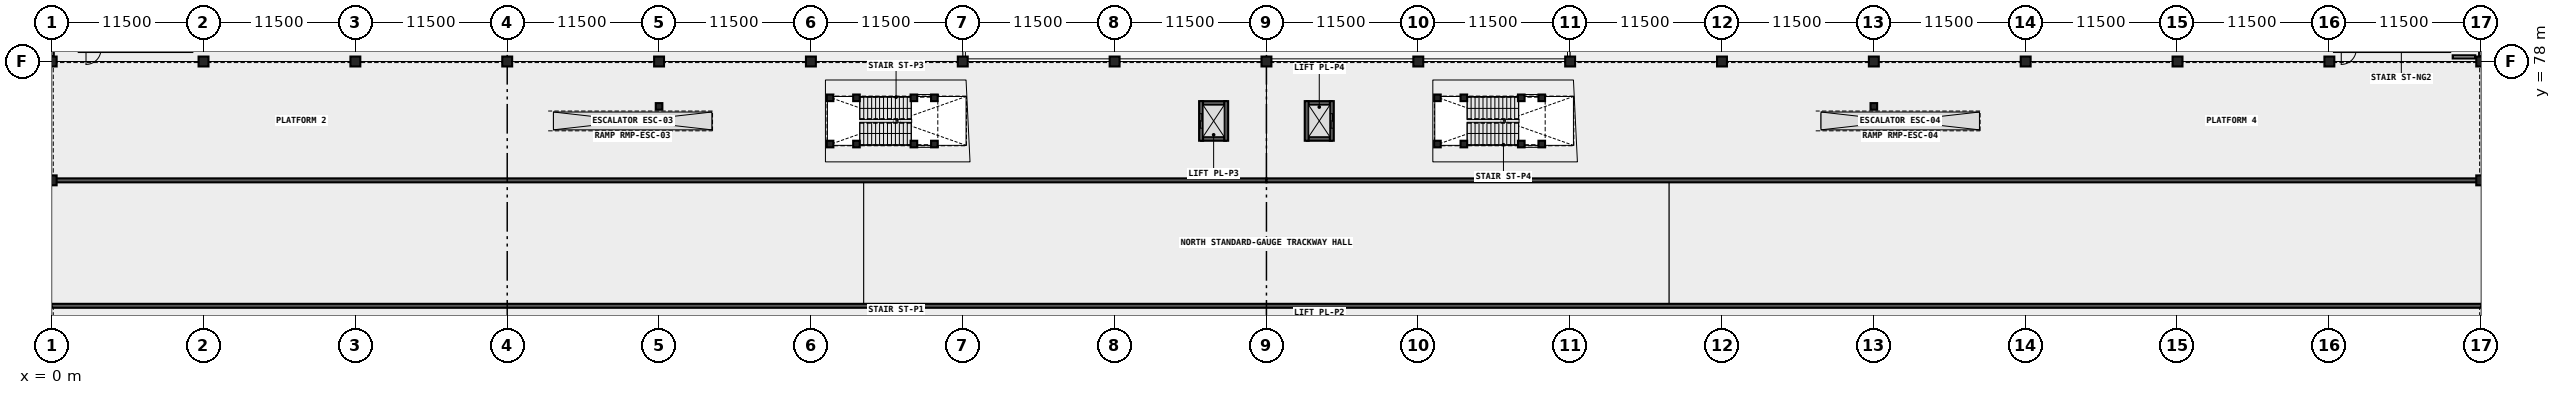
"""IFC4 building model, lengths in metres.
Left out: names, types, materials, properties, quantities, classifications, styles, units other than length and angle.
Written with IfcOpenShell. Run it as: python <this file> out.ifc"""

import sys

from ifc_helpers import new_model, si_unit, direction, frame, frame_2d, origin, origin_2d, place, context, subcontext, project, spatial, rectangle, extrude, element, fill, save


model = new_model("IFC4")
c1 = context("Model", 3, precision=1e-05, world=origin(), true_north=direction((0.0, 1.0)))
c2 = subcontext(c1, "Body", "Model", "MODEL_VIEW")
j1 = project(units=[si_unit("LENGTHUNIT", "METRE"), si_unit("PLANEANGLEUNIT", "RADIAN")], contexts=[c1])
p1 = place(None, origin())
s1 = spatial("IfcSite", under=j1, at=p1, CompositionType="ELEMENT")
p2 = place(p1, origin())
s2 = spatial("IfcBuilding", under=s1, at=p2, CompositionType="ELEMENT")
p3 = place(p2, origin())
s3 = spatial("IfcBuildingStorey", under=s2, at=p3, CompositionType="ELEMENT", Elevation=0.0)
for number, where, z_axis, x_axis in (
    (1, (0.0, 78.0, 0.0), (0.0, 0.0, 1.0), (1.0, 0.0, 0.0)),
    (2, (11.5, 78.0, 0.0), (0.0, 0.0, 1.0), (1.0, 0.0, 0.0)),
    (3, (23.0, 78.0, 0.0), (0.0, 0.0, 1.0), (1.0, 0.0, 0.0)),
    (4, (34.5, 78.0, 0.0), (0.0, 0.0, 1.0), (1.0, 0.0, 0.0)),
    (5, (46.0, 78.0, 0.0), (0.0, 0.0, 1.0), (1.0, 0.0, 0.0)),
    (6, (57.5, 78.0, 0.0), (0.0, 0.0, 1.0), (1.0, 0.0, 0.0)),
    (7, (69.0, 78.0, 0.0), (0.0, 0.0, 1.0), (1.0, 0.0, 0.0)),
    (8, (80.5, 78.0, 0.0), (0.0, 0.0, 1.0), (1.0, 0.0, 0.0)),
    (9, (92.0, 78.0, 0.0), (0.0, 0.0, 1.0), (1.0, 0.0, 0.0)),
    (10, (103.5, 78.0, 0.0), (0.0, 0.0, 1.0), (1.0, 0.0, 0.0)),
    (11, (115.0, 78.0, 0.0), (0.0, 0.0, 1.0), (1.0, 0.0, 0.0)),
    (12, (126.5, 78.0, 0.0), (0.0, 0.0, 1.0), (1.0, 0.0, 0.0)),
    (13, (138.0, 78.0, 0.0), (0.0, 0.0, 1.0), (1.0, 0.0, 0.0)),
    (14, (149.5, 78.0, 0.0), (0.0, 0.0, 1.0), (1.0, 0.0, 0.0)),
    (15, (161.0, 78.0, 0.0), (0.0, 0.0, 1.0), (1.0, 0.0, 0.0)),
    (16, (172.5, 78.0, 0.0), (0.0, 0.0, 1.0), (1.0, 0.0, 0.0)),
    (17, (184.0, 78.0, 0.0), (0.0, 0.0, 1.0), (1.0, 0.0, 0.0)),
):
    element("IfcColumn", number, at=place(p3, frame(where, z_axis=z_axis, x_axis=x_axis)), inside=s3, PredefinedType="COLUMN", context=c2, shape_type="SweptSolid", body=[
        extrude(rectangle(XDim=0.75, YDim=0.75, at=origin_2d()), origin(), (0.0, 0.0, 1.0), 4.2),
    ])
for number, where, z_axis, x_axis in (
    (18, (87.05, 72.15, 0.95), (0.0, 0.0, 1.0), (1.0, 0.0, 0.0)),
    (19, (87.05, 74.85, 0.95), (0.0, 0.0, 1.0), (1.0, 0.0, 0.0)),
):
    element("IfcWall", number, at=place(p3, frame(where, z_axis=z_axis, x_axis=x_axis)), inside=s3, PredefinedType="SHEAR", context=c2, shape_type="SweptSolid", body=[
        extrude(rectangle(XDim=1.9, YDim=0.3, at=frame_2d((0.95, 0.0))), origin(), (0.0, 0.0, 1.0), 3.25),
    ])
p4 = place(p3, frame((87.05, 72.0, 0.95), z_axis=(0.0, 0.0, 1.0), x_axis=(0.0, 1.0, 0.0)))
e20 = element("IfcWall", 20, at=p4, inside=s3, PredefinedType="SHEAR", context=c2, shape_type="SweptSolid", body=[
    extrude(rectangle(XDim=3.0, YDim=0.3, at=frame_2d((1.5, 0.0))), origin(), (0.0, 0.0, 1.0), 3.25),
])
p5 = place(p4, frame((0.95, 0.0, 0.3)))
e21 = element("IfcOpeningElement", 21, at=p5, cuts=e20, PredefinedType="OPENING", context=c2, shape_type="SweptSolid", body=[
    extrude(rectangle(XDim=1.1, YDim=2.15, at=frame_2d((0.55, 1.075))), frame((0.0, 0.16, 0.0), z_axis=(0.0, -1.0, 0.0), x_axis=(1.0, 0.0, 0.0)), (0.0, 0.0, 1.0), 0.32),
])
p6 = place(p3, frame((88.95, 72.0, 0.95), z_axis=(0.0, 0.0, 1.0), x_axis=(0.0, 1.0, 0.0)))
e22 = element("IfcWall", 22, at=p6, inside=s3, PredefinedType="SHEAR", context=c2, shape_type="SweptSolid", body=[
    extrude(rectangle(XDim=3.0, YDim=0.3, at=frame_2d((1.5, 0.0))), origin(), (0.0, 0.0, 1.0), 3.25),
])
for number, where, z_axis, x_axis in (
    (23, (95.05, 72.15, 0.95), (0.0, 0.0, 1.0), (1.0, 0.0, 0.0)),
    (24, (95.05, 74.85, 0.95), (0.0, 0.0, 1.0), (1.0, 0.0, 0.0)),
):
    element("IfcWall", number, at=place(p3, frame(where, z_axis=z_axis, x_axis=x_axis)), inside=s3, PredefinedType="SHEAR", context=c2, shape_type="SweptSolid", body=[
        extrude(rectangle(XDim=1.9, YDim=0.3, at=frame_2d((0.95, 0.0))), origin(), (0.0, 0.0, 1.0), 3.25),
    ])
p7 = place(p3, frame((95.05, 72.0, 0.95), z_axis=(0.0, 0.0, 1.0), x_axis=(0.0, 1.0, 0.0)))
e25 = element("IfcWall", 25, at=p7, inside=s3, PredefinedType="SHEAR", context=c2, shape_type="SweptSolid", body=[
    extrude(rectangle(XDim=3.0, YDim=0.3, at=frame_2d((1.5, 0.0))), origin(), (0.0, 0.0, 1.0), 3.25),
])
p8 = place(p3, frame((96.95, 72.0, 0.95), z_axis=(0.0, 0.0, 1.0), x_axis=(0.0, 1.0, 0.0)))
e26 = element("IfcWall", 26, at=p8, inside=s3, PredefinedType="SHEAR", context=c2, shape_type="SweptSolid", body=[
    extrude(rectangle(XDim=3.0, YDim=0.3, at=frame_2d((1.5, 0.0))), origin(), (0.0, 0.0, 1.0), 3.25),
])
p9 = place(p8, frame((0.95, 0.0, 0.3)))
e27 = element("IfcOpeningElement", 27, at=p9, cuts=e26, PredefinedType="OPENING", context=c2, shape_type="SweptSolid", body=[
    extrude(rectangle(XDim=1.1, YDim=2.15, at=frame_2d((0.55, 1.075))), frame((0.0, 0.16, 0.0), z_axis=(0.0, -1.0, 0.0), x_axis=(1.0, 0.0, 0.0)), (0.0, 0.0, 1.0), 0.32),
])
p10 = place(p3, frame((0.0, 59.5, -0.32), z_axis=(0.0, 0.0, 1.0), x_axis=(1.0, 0.0, 0.0)))
e28 = element("IfcWall", 28, at=p10, inside=s3, PredefinedType="SHEAR", context=c2, shape_type="SweptSolid", body=[
    extrude(rectangle(XDim=184.0, YDim=0.3, at=frame_2d((92.0, 0.0))), origin(), (0.0, 0.0, 1.0), 1.27),
])
for number, where, z_axis, x_axis in (
    (29, (58.95, 71.75, -0.32), (0.0, 0.0, 1.0), (1.0, 0.0, 0.0)),
    (30, (58.95, 75.25, -0.32), (0.0, 0.0, 1.0), (1.0, 0.0, 0.0)),
    (31, (60.95, 71.75, -0.32), (0.0, 0.0, 1.0), (1.0, 0.0, 0.0)),
    (32, (60.95, 75.25, -0.32), (0.0, 0.0, 1.0), (1.0, 0.0, 0.0)),
):
    element("IfcColumn", number, at=place(p3, frame(where, z_axis=z_axis, x_axis=x_axis)), inside=s3, PredefinedType="COLUMN", context=c2, shape_type="SweptSolid", body=[
        extrude(rectangle(XDim=0.5, YDim=0.5, at=origin_2d()), origin(), (0.0, 0.0, 1.0), 4.22),
    ])
for number, where, z_axis, x_axis in (
    (33, (65.3, 71.75, -0.32), (0.0, 0.0, 1.0), (1.0, 0.0, 0.0)),
    (34, (65.3, 75.25, -0.32), (0.0, 0.0, 1.0), (1.0, 0.0, 0.0)),
    (35, (66.85, 71.75, -0.32), (0.0, 0.0, 1.0), (1.0, 0.0, 0.0)),
    (36, (66.85, 75.25, -0.32), (0.0, 0.0, 1.0), (1.0, 0.0, 0.0)),
):
    element("IfcColumn", number, at=place(p3, frame(where, z_axis=z_axis, x_axis=x_axis)), inside=s3, PredefinedType="COLUMN", context=c2, shape_type="SweptSolid", body=[
        extrude(rectangle(XDim=0.5, YDim=0.5, at=origin_2d()), origin(), (0.0, 0.0, 1.0), 2.24),
    ])
p11 = place(p3, frame((0.0, 69.0, -0.32), z_axis=(0.0, 0.0, 1.0), x_axis=(1.0, 0.0, 0.0)))
e37 = element("IfcWall", 37, at=p11, inside=s3, PredefinedType="SHEAR", context=c2, shape_type="SweptSolid", body=[
    extrude(rectangle(XDim=92.0, YDim=0.3, at=frame_2d((46.0, 0.0))), origin(), (0.0, 0.0, 1.0), 1.27),
])
for number, where, z_axis, x_axis in (
    (38, (104.95, 71.75, -0.32), (0.0, 0.0, 1.0), (1.0, 0.0, 0.0)),
    (39, (104.95, 75.25, -0.32), (0.0, 0.0, 1.0), (1.0, 0.0, 0.0)),
    (40, (106.95, 71.75, -0.32), (0.0, 0.0, 1.0), (1.0, 0.0, 0.0)),
    (41, (106.95, 75.25, -0.32), (0.0, 0.0, 1.0), (1.0, 0.0, 0.0)),
):
    element("IfcColumn", number, at=place(p3, frame(where, z_axis=z_axis, x_axis=x_axis)), inside=s3, PredefinedType="COLUMN", context=c2, shape_type="SweptSolid", body=[
        extrude(rectangle(XDim=0.5, YDim=0.5, at=origin_2d()), origin(), (0.0, 0.0, 1.0), 4.22),
    ])
for number, where, z_axis, x_axis in (
    (42, (111.3, 71.75, -0.32), (0.0, 0.0, 1.0), (1.0, 0.0, 0.0)),
    (43, (111.3, 75.25, -0.32), (0.0, 0.0, 1.0), (1.0, 0.0, 0.0)),
    (44, (112.85, 71.75, -0.32), (0.0, 0.0, 1.0), (1.0, 0.0, 0.0)),
    (45, (112.85, 75.25, -0.32), (0.0, 0.0, 1.0), (1.0, 0.0, 0.0)),
):
    element("IfcColumn", number, at=place(p3, frame(where, z_axis=z_axis, x_axis=x_axis)), inside=s3, PredefinedType="COLUMN", context=c2, shape_type="SweptSolid", body=[
        extrude(rectangle(XDim=0.5, YDim=0.5, at=origin_2d()), origin(), (0.0, 0.0, 1.0), 2.24),
    ])
p12 = place(p3, frame((92.0, 69.0, -0.32), z_axis=(0.0, 0.0, 1.0), x_axis=(1.0, 0.0, 0.0)))
e46 = element("IfcWall", 46, at=p12, inside=s3, PredefinedType="SHEAR", context=c2, shape_type="SweptSolid", body=[
    extrude(rectangle(XDim=92.0, YDim=0.3, at=frame_2d((46.0, 0.0))), origin(), (0.0, 0.0, 1.0), 1.27),
])
p13 = place(p3, frame((0.0, 69.0, 0.55), z_axis=(0.0, 0.0, 1.0), x_axis=(1.0, 0.0, 0.0)))
e47 = element("IfcColumn", 47, at=p13, inside=s3, PredefinedType="COLUMN", context=c2, shape_type="SweptSolid", body=[
    extrude(rectangle(XDim=0.75, YDim=0.75, at=origin_2d()), origin(), (0.0, 0.0, 1.0), 3.65),
])
for number, where, z_axis, x_axis in (
    (48, (46.0, 72.4, 0.0), (0.0, 0.0, 1.0), (1.0, 0.0, 0.0)),
    (49, (46.0, 74.6, 0.0), (0.0, 0.0, 1.0), (1.0, 0.0, 0.0)),
    (50, (138.0, 72.4, 0.0), (0.0, 0.0, 1.0), (1.0, 0.0, 0.0)),
    (51, (138.0, 74.6, 0.0), (0.0, 0.0, 1.0), (1.0, 0.0, 0.0)),
):
    element("IfcColumn", number, at=place(p3, frame(where, z_axis=z_axis, x_axis=x_axis)), inside=s3, PredefinedType="COLUMN", context=c2, shape_type="SweptSolid", body=[
        extrude(rectangle(XDim=0.5, YDim=0.5, at=origin_2d()), origin(), (0.0, 0.0, 1.0), 4.2),
    ])
p14 = place(p3, frame((184.0, 69.0, 0.55), z_axis=(0.0, 0.0, 1.0), x_axis=(1.0, 0.0, 0.0)))
e52 = element("IfcColumn", 52, at=p14, inside=s3, PredefinedType="COLUMN", context=c2, shape_type="SweptSolid", body=[
    extrude(rectangle(XDim=0.75, YDim=0.75, at=origin_2d()), origin(), (0.0, 0.0, 1.0), 3.65),
])
p15 = place(p3, frame((0.0, 78.395, 0.0), z_axis=(0.0, 0.0, 1.0), x_axis=(0.0, 1.0, 0.0)))
e53 = element("IfcWall", 53, at=p15, inside=s3, PredefinedType="SOLIDWALL", context=c2, shape_type="SweptSolid", body=[
    extrude(rectangle(XDim=5.435, YDim=0.32, at=frame_2d((2.718, 0.0))), origin(), (0.0, 0.0, 1.0), 3.2),
])
p16 = place(p15, frame((1.768, 0.0, 0.0)))
e54 = element("IfcOpeningElement", 54, at=p16, cuts=e53, PredefinedType="OPENING", context=c2, shape_type="SweptSolid", body=[
    extrude(rectangle(XDim=1.9, YDim=2.2, at=frame_2d((0.95, 1.1))), frame((0.0, 0.17, 0.0), z_axis=(0.0, -1.0, 0.0), x_axis=(1.0, 0.0, 0.0)), (0.0, 0.0, 1.0), 0.34),
])
p17 = place(p3, frame((184.0, 78.395, 0.0), z_axis=(0.0, 0.0, 1.0), x_axis=(0.0, 1.0, 0.0)))
e55 = element("IfcWall", 55, at=p17, inside=s3, PredefinedType="SOLIDWALL", context=c2, shape_type="SweptSolid", body=[
    extrude(rectangle(XDim=5.435, YDim=0.32, at=frame_2d((2.718, 0.0))), origin(), (0.0, 0.0, 1.0), 3.2),
])
p18 = place(p17, frame((1.768, 0.0, 0.0)))
e56 = element("IfcOpeningElement", 56, at=p18, cuts=e55, PredefinedType="OPENING", context=c2, shape_type="SweptSolid", body=[
    extrude(rectangle(XDim=1.9, YDim=2.2, at=frame_2d((0.95, 1.1))), frame((0.0, 0.17, 0.0), z_axis=(0.0, -1.0, 0.0), x_axis=(1.0, 0.0, 0.0)), (0.0, 0.0, 1.0), 0.34),
])
p19 = place(p3, frame((181.84, 78.35, 0.0), z_axis=(0.0, 0.0, 1.0), x_axis=(1.0, 0.0, 0.0)))
e57 = element("IfcWall", 57, at=p19, inside=s3, PredefinedType="SOLIDWALL", context=c2, shape_type="SweptSolid", body=[
    extrude(rectangle(XDim=1.71, YDim=0.24, at=frame_2d((0.855, 0.0))), origin(), (0.0, 0.0, 1.0), 3.88),
])
p20 = place(p5, origin())
e58 = element("IfcDoor", 58, at=p20, inside=s3, OperationType="SLIDING_TO_LEFT", PredefinedType="DOOR", context=c2, shape_type="SweptSolid", body=[
    extrude(rectangle(XDim=1.1, YDim=2.15, at=frame_2d((0.55, 1.075))), frame((0.0, 0.025, 0.0), z_axis=(0.0, -1.0, 0.0), x_axis=(1.0, 0.0, 0.0)), (0.0, 0.0, 1.0), 0.05),
])
fill(e21, e58)
p21 = place(p9, origin())
e59 = element("IfcDoor", 59, at=p21, inside=s3, OperationType="SLIDING_TO_LEFT", PredefinedType="DOOR", context=c2, shape_type="SweptSolid", body=[
    extrude(rectangle(XDim=1.1, YDim=2.15, at=frame_2d((0.55, 1.075))), frame((0.0, 0.025, 0.0), z_axis=(0.0, -1.0, 0.0), x_axis=(1.0, 0.0, 0.0)), (0.0, 0.0, 1.0), 0.05),
])
fill(e27, e59)
save(model, sys.argv[1])
